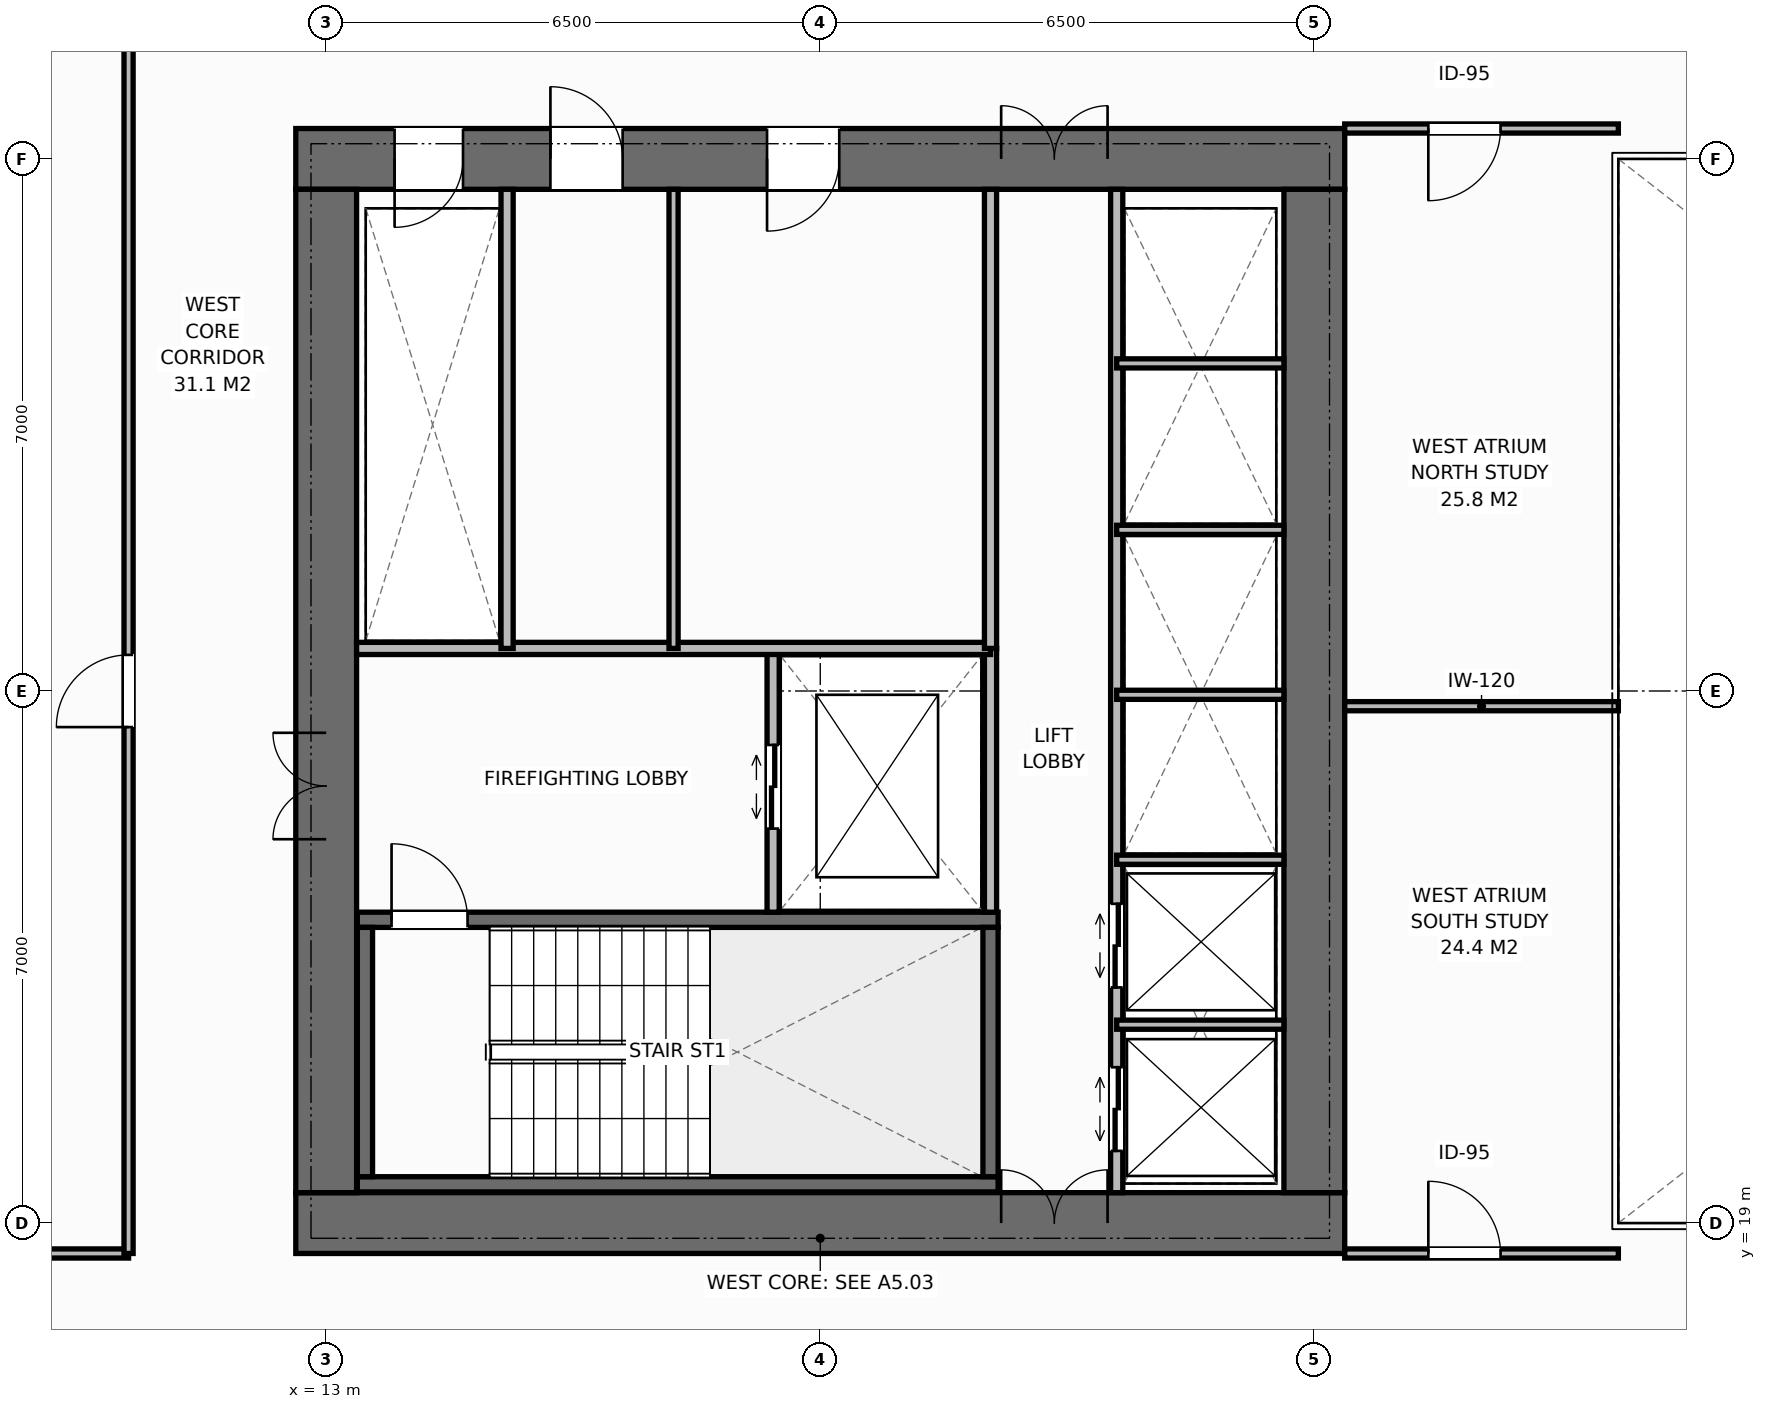
"""IFC4 building model, lengths in metres.
Left out: names, types, materials, properties, quantities, classifications, styles, units other than length and angle.
Written with IfcOpenShell. Run it as: python <this file> out.ifc"""

import sys

from ifc_helpers import new_model, si_unit, direction, frame, frame_2d, origin, place, context, subcontext, project, spatial, rectangle, extrude, element, fill, save


model = new_model("IFC4")
c1 = context("Model", 3, precision=1e-05, world=origin(), true_north=direction((0.0, 1.0)))
c2 = subcontext(c1, "Body", "Model", "MODEL_VIEW")
j1 = project(units=[si_unit("LENGTHUNIT", "METRE"), si_unit("PLANEANGLEUNIT", "RADIAN")], contexts=[c1])
p1 = place(None, origin())
s1 = spatial("IfcSite", under=j1, at=p1, CompositionType="ELEMENT")
p2 = place(p1, origin())
s2 = spatial("IfcBuilding", under=s1, at=p2, CompositionType="ELEMENT")
p3 = place(p2, frame((0.0, 0.0, 65.8)))
s3 = spatial("IfcBuildingStorey", under=s2, at=p3, CompositionType="ELEMENT", Elevation=65.8)
p4 = place(p3, frame((12.6, 19.0, 0.0), z_axis=(0.0, 0.0, 1.0), x_axis=(1.0, 0.0, 0.0)))
e1 = element("IfcWall", 1, at=p4, inside=s3, PredefinedType="SHEAR", context=c2, shape_type="SweptSolid", body=[
    extrude(rectangle(XDim=13.8, YDim=0.8, at=frame_2d((6.9, 0.0))), origin(), (0.0, 0.0, 1.0), 3.8),
])
p5 = place(p4, frame((9.28, 0.0, 0.0)))
e2 = element("IfcOpeningElement", 2, at=p5, cuts=e1, PredefinedType="OPENING", context=c2, shape_type="SweptSolid", body=[
    extrude(rectangle(XDim=1.4, YDim=2.2, at=frame_2d((0.7, 1.1))), frame((0.0, 0.41, 0.0), z_axis=(0.0, -1.0, 0.0), x_axis=(1.0, 0.0, 0.0)), (0.0, 0.0, 1.0), 0.82),
])
p6 = place(p3, frame((12.6, 33.0, 0.0), z_axis=(0.0, 0.0, 1.0), x_axis=(1.0, 0.0, 0.0)))
e3 = element("IfcWall", 3, at=p6, inside=s3, PredefinedType="SHEAR", context=c2, shape_type="SweptSolid", body=[
    extrude(rectangle(XDim=13.8, YDim=0.8, at=frame_2d((6.9, 0.0))), origin(), (0.0, 0.0, 1.0), 3.8),
])
p7 = place(p6, frame((1.3, 0.0, 0.0)))
e4 = element("IfcOpeningElement", 4, at=p7, cuts=e3, PredefinedType="OPENING", context=c2, shape_type="SweptSolid", body=[
    extrude(rectangle(XDim=0.9, YDim=2.15, at=frame_2d((0.45, 1.075))), frame((0.0, 0.41, 0.0), z_axis=(0.0, -1.0, 0.0), x_axis=(1.0, 0.0, 0.0)), (0.0, 0.0, 1.0), 0.82),
])
p8 = place(p6, frame((3.35, 0.0, 0.0)))
e5 = element("IfcOpeningElement", 5, at=p8, cuts=e3, PredefinedType="OPENING", context=c2, shape_type="SweptSolid", body=[
    extrude(rectangle(XDim=0.95, YDim=2.15, at=frame_2d((0.475, 1.075))), frame((0.0, 0.41, 0.0), z_axis=(0.0, -1.0, 0.0), x_axis=(1.0, 0.0, 0.0)), (0.0, 0.0, 1.0), 0.82),
])
p9 = place(p6, frame((6.2, 0.0, 0.0)))
e6 = element("IfcOpeningElement", 6, at=p9, cuts=e3, PredefinedType="OPENING", context=c2, shape_type="SweptSolid", body=[
    extrude(rectangle(XDim=0.95, YDim=2.15, at=frame_2d((0.475, 1.075))), frame((0.0, 0.41, 0.0), z_axis=(0.0, -1.0, 0.0), x_axis=(1.0, 0.0, 0.0)), (0.0, 0.0, 1.0), 0.82),
])
p10 = place(p6, frame((9.28, 0.0, 0.0)))
e7 = element("IfcOpeningElement", 7, at=p10, cuts=e3, PredefinedType="OPENING", context=c2, shape_type="SweptSolid", body=[
    extrude(rectangle(XDim=1.4, YDim=2.2, at=frame_2d((0.7, 1.1))), frame((0.0, 0.41, 0.0), z_axis=(0.0, -1.0, 0.0), x_axis=(1.0, 0.0, 0.0)), (0.0, 0.0, 1.0), 0.82),
])
p11 = place(p3, frame((13.0, 19.4, 0.0), z_axis=(0.0, 0.0, 1.0), x_axis=(0.0, 1.0, 0.0)))
e8 = element("IfcWall", 8, at=p11, inside=s3, PredefinedType="SHEAR", context=c2, shape_type="SweptSolid", body=[
    extrude(rectangle(XDim=13.2, YDim=0.8, at=frame_2d((6.6, 0.0))), origin(), (0.0, 0.0, 1.0), 3.8),
])
p12 = place(p11, frame((4.65, 0.0, 0.0)))
e9 = element("IfcOpeningElement", 9, at=p12, cuts=e8, PredefinedType="OPENING", context=c2, shape_type="SweptSolid", body=[
    extrude(rectangle(XDim=1.4, YDim=2.2, at=frame_2d((0.7, 1.1))), frame((0.0, 0.41, 0.0), z_axis=(0.0, -1.0, 0.0), x_axis=(1.0, 0.0, 0.0)), (0.0, 0.0, 1.0), 0.82),
])
p13 = place(p3, frame((26.0, 19.4, 0.0), z_axis=(0.0, 0.0, 1.0), x_axis=(0.0, 1.0, 0.0)))
e10 = element("IfcWall", 10, at=p13, inside=s3, PredefinedType="SHEAR", context=c2, shape_type="SweptSolid", body=[
    extrude(rectangle(XDim=13.2, YDim=0.8, at=frame_2d((6.6, 0.0))), origin(), (0.0, 0.0, 1.0), 3.8),
])
p14 = place(p3, frame((13.41, 19.51, 0.0), z_axis=(0.0, 0.0, 1.0), x_axis=(1.0, 0.0, 0.0)))
e11 = element("IfcWall", 11, at=p14, inside=s3, PredefinedType="SHEAR", context=c2, shape_type="SweptSolid", body=[
    extrude(rectangle(XDim=8.43, YDim=0.2, at=frame_2d((4.215, 0.0))), origin(), (0.0, 0.0, 1.0), 3.8),
])
p15 = place(p3, frame((13.41, 22.99, 0.0), z_axis=(0.0, 0.0, 1.0), x_axis=(1.0, 0.0, 0.0)))
e12 = element("IfcWall", 12, at=p15, inside=s3, PredefinedType="SHEAR", context=c2, shape_type="SweptSolid", body=[
    extrude(rectangle(XDim=8.43, YDim=0.2, at=frame_2d((4.215, 0.0))), origin(), (0.0, 0.0, 1.0), 3.8),
])
p16 = place(p15, frame((0.45, 0.0, 0.0)))
e13 = element("IfcOpeningElement", 13, at=p16, cuts=e12, PredefinedType="OPENING", context=c2, shape_type="SweptSolid", body=[
    extrude(rectangle(XDim=1.0, YDim=2.15, at=frame_2d((0.5, 1.075))), frame((0.0, 0.11, 0.0), z_axis=(0.0, -1.0, 0.0), x_axis=(1.0, 0.0, 0.0)), (0.0, 0.0, 1.0), 0.22),
])
for number, where, z_axis, x_axis in (
    (14, (13.51, 19.61, 0.0), (0.0, 0.0, 1.0), (0.0, 1.0, 0.0)),
    (15, (21.74, 19.61, 0.0), (0.0, 0.0, 1.0), (0.0, 1.0, 0.0)),
):
    element("IfcWall", number, at=place(p3, frame(where, z_axis=z_axis, x_axis=x_axis)), inside=s3, PredefinedType="SHEAR", context=c2, shape_type="SweptSolid", body=[
        extrude(rectangle(XDim=3.28, YDim=0.2, at=frame_2d((1.64, 0.0))), origin(), (0.0, 0.0, 1.0), 3.8),
    ])
p17 = place(p3, frame((21.74, 23.09, 0.0), z_axis=(0.0, 0.0, 1.0), x_axis=(0.0, 1.0, 0.0)))
e16 = element("IfcWall", 16, at=p17, inside=s3, PredefinedType="STANDARD", context=c2, shape_type="SweptSolid", body=[
    extrude(rectangle(XDim=3.47, YDim=0.16, at=frame_2d((1.735, 0.0))), origin(), (0.0, 0.0, 1.0), 3.55),
])
p18 = place(p3, frame((18.88, 23.09, 0.0), z_axis=(0.0, 0.0, 1.0), x_axis=(0.0, 1.0, 0.0)))
e17 = element("IfcWall", 17, at=p18, inside=s3, PredefinedType="STANDARD", context=c2, shape_type="SweptSolid", body=[
    extrude(rectangle(XDim=3.47, YDim=0.16, at=frame_2d((1.735, 0.0))), origin(), (0.0, 0.0, 1.0), 3.55),
])
p19 = place(p18, frame((1.1, 0.0, 0.0)))
e18 = element("IfcOpeningElement", 18, at=p19, cuts=e17, PredefinedType="OPENING", context=c2, shape_type="SweptSolid", body=[
    extrude(rectangle(XDim=1.1, YDim=2.2, at=frame_2d((0.55, 1.1))), frame((0.0, 0.09, 0.0), z_axis=(0.0, -1.0, 0.0), x_axis=(1.0, 0.0, 0.0)), (0.0, 0.0, 1.0), 0.18),
])
p20 = place(p3, frame((13.4, 26.56, 0.0), z_axis=(0.0, 0.0, 1.0), x_axis=(1.0, 0.0, 0.0)))
e19 = element("IfcWall", 19, at=p20, inside=s3, PredefinedType="STANDARD", context=c2, shape_type="SweptSolid", body=[
    extrude(rectangle(XDim=8.34, YDim=0.16, at=frame_2d((4.17, 0.0))), origin(), (0.0, 0.0, 1.0), 3.55),
])
p21 = place(p3, frame((15.38, 26.56, 0.0), z_axis=(0.0, 0.0, 1.0), x_axis=(0.0, 1.0, 0.0)))
e20 = element("IfcWall", 20, at=p21, inside=s3, PredefinedType="STANDARD", context=c2, shape_type="SweptSolid", body=[
    extrude(rectangle(XDim=6.04, YDim=0.16, at=frame_2d((3.02, 0.0))), origin(), (0.0, 0.0, 1.0), 3.55),
])
p22 = place(p3, frame((17.57, 26.56, 0.0), z_axis=(0.0, 0.0, 1.0), x_axis=(0.0, 1.0, 0.0)))
e21 = element("IfcWall", 21, at=p22, inside=s3, PredefinedType="PARTITIONING", context=c2, shape_type="SweptSolid", body=[
    extrude(rectangle(XDim=6.04, YDim=0.12, at=frame_2d((3.02, 0.0))), origin(), (0.0, 0.0, 1.0), 3.55),
])
p23 = place(p3, frame((21.74, 26.56, 0.0), z_axis=(0.0, 0.0, 1.0), x_axis=(0.0, 1.0, 0.0)))
e22 = element("IfcWall", 22, at=p23, inside=s3, PredefinedType="STANDARD", context=c2, shape_type="SweptSolid", body=[
    extrude(rectangle(XDim=6.04, YDim=0.16, at=frame_2d((3.02, 0.0))), origin(), (0.0, 0.0, 1.0), 3.55),
])
p24 = place(p3, frame((23.4, 19.4, 0.0), z_axis=(0.0, 0.0, 1.0), x_axis=(0.0, 1.0, 0.0)))
e23 = element("IfcWall", 23, at=p24, inside=s3, PredefinedType="STANDARD", context=c2, shape_type="SweptSolid", body=[
    extrude(rectangle(XDim=13.2, YDim=0.16, at=frame_2d((6.6, 0.0))), origin(), (0.0, 0.0, 1.0), 3.55),
])
p25 = place(p24, frame((0.55, 0.0, 0.0)))
e24 = element("IfcOpeningElement", 24, at=p25, cuts=e23, PredefinedType="OPENING", context=c2, shape_type="SweptSolid", body=[
    extrude(rectangle(XDim=1.1, YDim=2.2, at=frame_2d((0.55, 1.1))), frame((0.0, 0.09, 0.0), z_axis=(0.0, -1.0, 0.0), x_axis=(1.0, 0.0, 0.0)), (0.0, 0.0, 1.0), 0.18),
])
p26 = place(p24, frame((2.7, 0.0, 0.0)))
e25 = element("IfcOpeningElement", 25, at=p26, cuts=e23, PredefinedType="OPENING", context=c2, shape_type="SweptSolid", body=[
    extrude(rectangle(XDim=1.1, YDim=2.2, at=frame_2d((0.55, 1.1))), frame((0.0, 0.09, 0.0), z_axis=(0.0, -1.0, 0.0), x_axis=(1.0, 0.0, 0.0)), (0.0, 0.0, 1.0), 0.18),
])
for number, where, z_axis, x_axis in (
    (26, (23.4, 21.61, 0.0), (0.0, 0.0, 1.0), (1.0, 0.0, 0.0)),
    (27, (23.4, 23.78, 0.0), (0.0, 0.0, 1.0), (1.0, 0.0, 0.0)),
    (28, (23.4, 25.95, 0.0), (0.0, 0.0, 1.0), (1.0, 0.0, 0.0)),
    (29, (23.4, 28.12, 0.0), (0.0, 0.0, 1.0), (1.0, 0.0, 0.0)),
    (30, (23.4, 30.31, 0.0), (0.0, 0.0, 1.0), (1.0, 0.0, 0.0)),
):
    element("IfcWall", number, at=place(p3, frame(where, z_axis=z_axis, x_axis=x_axis)), inside=s3, PredefinedType="PARTITIONING", context=c2, shape_type="SweptSolid", body=[
        extrude(rectangle(XDim=2.2, YDim=0.12, at=frame_2d((1.1, 0.0))), origin(), (0.0, 0.0, 1.0), 3.55),
    ])
p27 = place(p3, frame((26.4, 25.8, 0.0), z_axis=(0.0, 0.0, 1.0), x_axis=(1.0, 0.0, 0.0)))
e31 = element("IfcWall", 31, at=p27, inside=s3, PredefinedType="PARTITIONING", context=c2, shape_type="SweptSolid", body=[
    extrude(rectangle(XDim=3.6, YDim=0.12, at=frame_2d((1.8, 0.0))), origin(), (0.0, 0.0, 1.0), 3.55),
])
p28 = place(p3, frame((26.4, 18.6, 0.0), z_axis=(0.0, 0.0, 1.0), x_axis=(1.0, 0.0, 0.0)))
e32 = element("IfcWall", 32, at=p28, inside=s3, PredefinedType="PARTITIONING", context=c2, shape_type="SweptSolid", body=[
    extrude(rectangle(XDim=3.6, YDim=0.12, at=frame_2d((1.8, 0.0))), origin(), (0.0, 0.0, 1.0), 3.55),
])
p29 = place(p28, frame((1.1, 0.0, 0.0)))
e33 = element("IfcOpeningElement", 33, at=p29, cuts=e32, PredefinedType="OPENING", context=c2, shape_type="SweptSolid", body=[
    extrude(rectangle(XDim=0.95, YDim=2.15, at=frame_2d((0.475, 1.075))), frame((0.0, 0.07, 0.0), z_axis=(0.0, -1.0, 0.0), x_axis=(1.0, 0.0, 0.0)), (0.0, 0.0, 1.0), 0.14),
])
p30 = place(p3, frame((26.4, 33.4, 0.0), z_axis=(0.0, 0.0, 1.0), x_axis=(1.0, 0.0, 0.0)))
e34 = element("IfcWall", 34, at=p30, inside=s3, PredefinedType="PARTITIONING", context=c2, shape_type="SweptSolid", body=[
    extrude(rectangle(XDim=3.6, YDim=0.12, at=frame_2d((1.8, 0.0))), origin(), (0.0, 0.0, 1.0), 3.55),
])
p31 = place(p30, frame((1.1, 0.0, 0.0)))
e35 = element("IfcOpeningElement", 35, at=p31, cuts=e34, PredefinedType="OPENING", context=c2, shape_type="SweptSolid", body=[
    extrude(rectangle(XDim=0.95, YDim=2.15, at=frame_2d((0.475, 1.075))), frame((0.0, 0.07, 0.0), z_axis=(0.0, -1.0, 0.0), x_axis=(1.0, 0.0, 0.0)), (0.0, 0.0, 1.0), 0.14),
])
p32 = place(p3, frame((-0.18, 18.6, 0.0), z_axis=(0.0, 0.0, 1.0), x_axis=(1.0, 0.0, 0.0)))
e36 = element("IfcWall", 36, at=p32, inside=s3, PredefinedType="PARTITIONING", context=c2, shape_type="SweptSolid", body=[
    extrude(rectangle(XDim=10.58, YDim=0.12, at=frame_2d((5.29, 0.0))), origin(), (0.0, 0.0, 1.0), 3.55),
])
p33 = place(p3, frame((10.4, 18.6, 0.0), z_axis=(0.0, 0.0, 1.0), x_axis=(0.0, 1.0, 0.0)))
e37 = element("IfcWall", 37, at=p33, inside=s3, PredefinedType="PARTITIONING", context=c2, shape_type="SweptSolid", body=[
    extrude(rectangle(XDim=16.9, YDim=0.12, at=frame_2d((8.45, 0.0))), origin(), (0.0, 0.0, 1.0), 3.55),
])
p34 = place(p33, frame((6.925, 0.0, 0.0)))
e38 = element("IfcOpeningElement", 38, at=p34, cuts=e37, PredefinedType="OPENING", context=c2, shape_type="SweptSolid", body=[
    extrude(rectangle(XDim=0.95, YDim=2.15, at=frame_2d((0.475, 1.075))), frame((0.0, 0.07, 0.0), z_axis=(0.0, -1.0, 0.0), x_axis=(1.0, 0.0, 0.0)), (0.0, 0.0, 1.0), 0.14),
])
p35 = place(p16, origin())
e39 = element("IfcDoor", 39, at=p35, inside=s3, OperationType="SINGLE_SWING_LEFT", PredefinedType="DOOR", context=c2, shape_type="SweptSolid", body=[
    extrude(rectangle(XDim=1.0, YDim=2.15, at=frame_2d((0.5, 1.075))), frame((0.0, 0.025, 0.0), z_axis=(0.0, -1.0, 0.0), x_axis=(1.0, 0.0, 0.0)), (0.0, 0.0, 1.0), 0.05),
])
fill(e13, e39)
p36 = place(p12, origin())
e40 = element("IfcDoor", 40, at=p36, inside=s3, OperationType="DOUBLE_DOOR_SINGLE_SWING", PredefinedType="DOOR", context=c2, shape_type="SweptSolid", body=[
    extrude(rectangle(XDim=1.4, YDim=2.2, at=frame_2d((0.7, 1.1))), frame((0.0, 0.025, 0.0), z_axis=(0.0, -1.0, 0.0), x_axis=(1.0, 0.0, 0.0)), (0.0, 0.0, 1.0), 0.05),
])
fill(e9, e40)
p37 = place(p19, origin())
e41 = element("IfcDoor", 41, at=p37, inside=s3, OperationType="DOUBLE_DOOR_SLIDING", PredefinedType="DOOR", context=c2, shape_type="SweptSolid", body=[
    extrude(rectangle(XDim=1.1, YDim=2.2, at=frame_2d((0.55, 1.1))), frame((0.0, 0.025, 0.0), z_axis=(0.0, -1.0, 0.0), x_axis=(1.0, 0.0, 0.0)), (0.0, 0.0, 1.0), 0.05),
])
fill(e18, e41)
p38 = place(p7, origin())
e42 = element("IfcDoor", 42, at=p38, inside=s3, OperationType="SINGLE_SWING_RIGHT", PredefinedType="DOOR", context=c2, shape_type="SweptSolid", body=[
    extrude(rectangle(XDim=0.9, YDim=2.15, at=frame_2d((0.45, 1.075))), frame((0.0, -0.075, 0.0), z_axis=(0.0, -1.0, 0.0), x_axis=(1.0, 0.0, 0.0)), (0.0, 0.0, 1.0), 0.05),
])
fill(e4, e42)
p39 = place(p8, origin())
e43 = element("IfcDoor", 43, at=p39, inside=s3, OperationType="SINGLE_SWING_LEFT", PredefinedType="DOOR", context=c2, shape_type="SweptSolid", body=[
    extrude(rectangle(XDim=0.95, YDim=2.15, at=frame_2d((0.475, 1.075))), frame((0.0, -0.075, 0.0), z_axis=(0.0, -1.0, 0.0), x_axis=(1.0, 0.0, 0.0)), (0.0, 0.0, 1.0), 0.05),
])
fill(e5, e43)
p40 = place(p9, origin())
e44 = element("IfcDoor", 44, at=p40, inside=s3, OperationType="SINGLE_SWING_RIGHT", PredefinedType="DOOR", context=c2, shape_type="SweptSolid", body=[
    extrude(rectangle(XDim=0.95, YDim=2.15, at=frame_2d((0.475, 1.075))), frame((0.0, -0.075, 0.0), z_axis=(0.0, -1.0, 0.0), x_axis=(1.0, 0.0, 0.0)), (0.0, 0.0, 1.0), 0.05),
])
fill(e6, e44)
p41 = place(p5, origin())
e45 = element("IfcDoor", 45, at=p41, inside=s3, OperationType="DOUBLE_DOOR_SINGLE_SWING", PredefinedType="DOOR", context=c2, shape_type="SweptSolid", body=[
    extrude(rectangle(XDim=1.4, YDim=2.2, at=frame_2d((0.7, 1.1))), frame((0.0, 0.125, 0.0), z_axis=(0.0, -1.0, 0.0), x_axis=(1.0, 0.0, 0.0)), (0.0, 0.0, 1.0), 0.05),
])
fill(e2, e45)
p42 = place(p10, origin())
e46 = element("IfcDoor", 46, at=p42, inside=s3, OperationType="DOUBLE_DOOR_SINGLE_SWING", PredefinedType="DOOR", context=c2, shape_type="SweptSolid", body=[
    extrude(rectangle(XDim=1.4, YDim=2.2, at=frame_2d((0.7, 1.1))), frame((0.0, -0.075, 0.0), z_axis=(0.0, -1.0, 0.0), x_axis=(1.0, 0.0, 0.0)), (0.0, 0.0, 1.0), 0.05),
])
fill(e7, e46)
p43 = place(p25, origin())
e47 = element("IfcDoor", 47, at=p43, inside=s3, OperationType="DOUBLE_DOOR_SLIDING", PredefinedType="DOOR", context=c2, shape_type="SweptSolid", body=[
    extrude(rectangle(XDim=1.1, YDim=2.2, at=frame_2d((0.55, 1.1))), frame((0.0, 0.025, 0.0), z_axis=(0.0, -1.0, 0.0), x_axis=(1.0, 0.0, 0.0)), (0.0, 0.0, 1.0), 0.05),
])
fill(e24, e47)
p44 = place(p26, origin())
e48 = element("IfcDoor", 48, at=p44, inside=s3, OperationType="DOUBLE_DOOR_SLIDING", PredefinedType="DOOR", context=c2, shape_type="SweptSolid", body=[
    extrude(rectangle(XDim=1.1, YDim=2.2, at=frame_2d((0.55, 1.1))), frame((0.0, 0.025, 0.0), z_axis=(0.0, -1.0, 0.0), x_axis=(1.0, 0.0, 0.0)), (0.0, 0.0, 1.0), 0.05),
])
fill(e25, e48)
p45 = place(p29, origin())
e49 = element("IfcDoor", 49, at=p45, inside=s3, OperationType="SINGLE_SWING_LEFT", PredefinedType="DOOR", context=c2, shape_type="SweptSolid", body=[
    extrude(rectangle(XDim=0.95, YDim=2.15, at=frame_2d((0.475, 1.075))), frame((0.0, 0.025, 0.0), z_axis=(0.0, -1.0, 0.0), x_axis=(1.0, 0.0, 0.0)), (0.0, 0.0, 1.0), 0.05),
])
fill(e33, e49)
p46 = place(p31, origin())
e50 = element("IfcDoor", 50, at=p46, inside=s3, OperationType="SINGLE_SWING_RIGHT", PredefinedType="DOOR", context=c2, shape_type="SweptSolid", body=[
    extrude(rectangle(XDim=0.95, YDim=2.15, at=frame_2d((0.475, 1.075))), frame((0.0, 0.025, 0.0), z_axis=(0.0, -1.0, 0.0), x_axis=(1.0, 0.0, 0.0)), (0.0, 0.0, 1.0), 0.05),
])
fill(e35, e50)
p47 = place(p34, origin())
e51 = element("IfcDoor", 51, at=p47, inside=s3, OperationType="SINGLE_SWING_LEFT", PredefinedType="DOOR", context=c2, shape_type="SweptSolid", body=[
    extrude(rectangle(XDim=0.95, YDim=2.15, at=frame_2d((0.475, 1.075))), frame((0.0, 0.025, 0.0), z_axis=(0.0, -1.0, 0.0), x_axis=(1.0, 0.0, 0.0)), (0.0, 0.0, 1.0), 0.05),
])
fill(e38, e51)
save(model, sys.argv[1])
